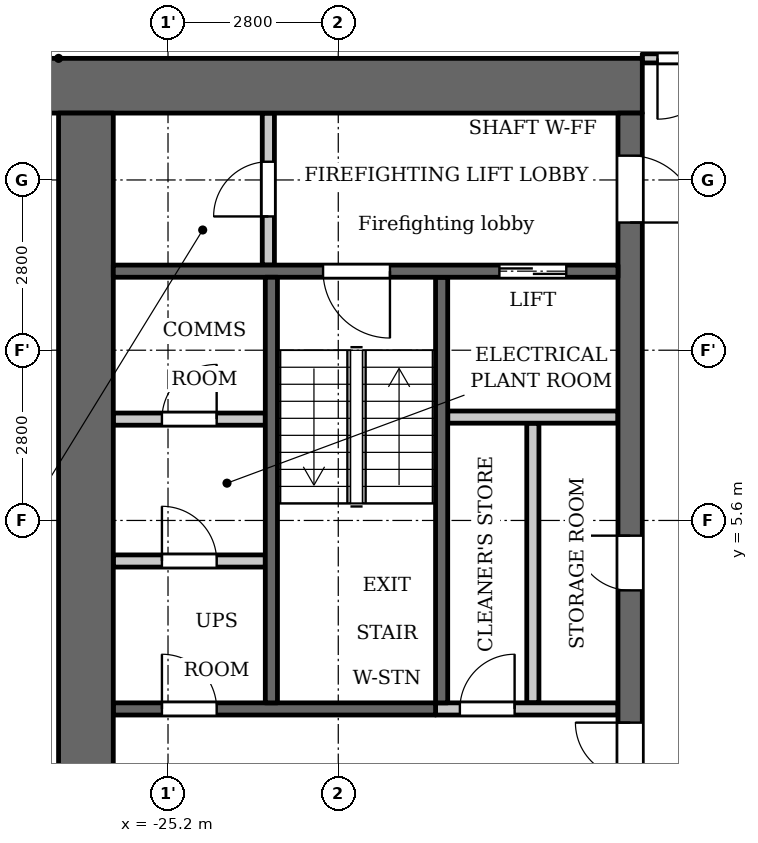
"""IFC4 building model, lengths in metres.
Left out: names, types, materials, properties, quantities, classifications, styles, units other than length and angle.
Written with IfcOpenShell. Run it as: python <this file> out.ifc"""

import sys

from ifc_helpers import new_model, si_unit, direction, frame, frame_2d, origin, place, context, subcontext, project, spatial, rectangle, extrude, element, fill, save


model = new_model("IFC4")
c1 = context("Model", 3, precision=1e-05, world=origin(), true_north=direction((0.0, 1.0)))
c2 = subcontext(c1, "Body", "Model", "MODEL_VIEW")
j1 = project(units=[si_unit("LENGTHUNIT", "METRE"), si_unit("PLANEANGLEUNIT", "RADIAN")], contexts=[c1])
p1 = place(None, origin())
s1 = spatial("IfcSite", under=j1, at=p1, CompositionType="ELEMENT")
p2 = place(p1, origin())
s2 = spatial("IfcBuilding", under=s1, at=p2, CompositionType="ELEMENT")
p3 = place(p2, frame((0.0, 0.0, 90.3)))
s3 = spatial("IfcBuildingStorey", under=s2, at=p3, CompositionType="ELEMENT", Elevation=90.3)
p4 = place(p3, frame((-20.7, 2.6, 0.0), z_axis=(0.0, 0.0, 1.0), x_axis=(0.0, 1.0, 0.0)))
e1 = element("IfcWall", 1, at=p4, inside=s3, PredefinedType="SHEAR", context=c2, shape_type="SweptSolid", body=[
    extrude(rectangle(XDim=7.0, YDim=0.2, at=frame_2d((3.5, 0.0))), origin(), (0.0, 0.0, 1.0), 3.2),
])
p5 = place(p3, frame((-20.8, 2.5, 0.0), z_axis=(0.0, 0.0, 1.0), x_axis=(-1.0, 0.0, 0.0)))
e2 = element("IfcWall", 2, at=p5, inside=s3, PredefinedType="SHEAR", context=c2, shape_type="SweptSolid", body=[
    extrude(rectangle(XDim=5.3, YDim=0.2, at=frame_2d((2.65, 0.0))), origin(), (0.0, 0.0, 1.0), 3.2),
])
p6 = place(p5, frame((3.6, 0.0, 0.0)))
e3 = element("IfcOpeningElement", 3, at=p6, cuts=e2, PredefinedType="OPENING", context=c2, shape_type="SweptSolid", body=[
    extrude(rectangle(XDim=0.9, YDim=2.1, at=frame_2d((0.45, 1.05))), frame((0.0, 0.11, 0.0), z_axis=(0.0, -1.0, 0.0), x_axis=(1.0, 0.0, 0.0)), (0.0, 0.0, 1.0), 0.22),
])
p7 = place(p3, frame((-17.4, 12.75, 0.0), z_axis=(0.0, 0.0, 1.0), x_axis=(-1.0, 0.0, 0.0)))
e4 = element("IfcWall", 4, at=p7, inside=s3, PredefinedType="SHEAR", context=c2, shape_type="SweptSolid", body=[
    extrude(rectangle(XDim=10.4, YDim=0.9, at=frame_2d((5.2, 0.0))), origin(), (0.0, 0.0, 1.0), 3.2),
])
p8 = place(p3, frame((-19.2, 2.6, 0.0), z_axis=(0.0, 0.0, 1.0), x_axis=(0.0, 1.0, 0.0)))
e5 = element("IfcWall", 5, at=p8, inside=s3, PredefinedType="PARTITIONING", context=c2, shape_type="SweptSolid", body=[
    extrude(rectangle(XDim=4.6, YDim=0.2, at=frame_2d((2.3, 0.0))), origin(), (0.0, 0.0, 1.0), 3.2),
])
p9 = place(p3, frame((-17.6, -12.3, 0.0), z_axis=(0.0, 0.0, 1.0), x_axis=(0.0, 1.0, 0.0)))
e6 = element("IfcWall", 6, at=p9, inside=s3, PredefinedType="SHEAR", context=c2, shape_type="SweptSolid", body=[
    extrude(rectangle(XDim=24.6, YDim=0.4, at=frame_2d((12.3, 0.0))), origin(), (0.0, 0.0, 1.0), 3.2),
])
p10 = place(p9, frame((6.0, 0.0, 0.0)))
e7 = element("IfcOpeningElement", 7, at=p10, cuts=e6, PredefinedType="OPENING", context=c2, shape_type="SweptSolid", body=[
    extrude(rectangle(XDim=1.1, YDim=2.1, at=frame_2d((0.55, 1.05))), frame((0.0, 0.21, 0.0), z_axis=(0.0, -1.0, 0.0), x_axis=(1.0, 0.0, 0.0)), (0.0, 0.0, 1.0), 0.42),
])
p11 = place(p9, frame((8.4, 0.0, 0.0)))
e8 = element("IfcOpeningElement", 8, at=p11, cuts=e6, PredefinedType="OPENING", context=c2, shape_type="SweptSolid", body=[
    extrude(rectangle(XDim=1.1, YDim=2.1, at=frame_2d((0.55, 1.05))), frame((0.0, 0.21, 0.0), z_axis=(0.0, -1.0, 0.0), x_axis=(1.0, 0.0, 0.0)), (0.0, 0.0, 1.0), 0.42),
])
p12 = place(p9, frame((10.8, 0.0, 0.0)))
e9 = element("IfcOpeningElement", 9, at=p12, cuts=e6, PredefinedType="OPENING", context=c2, shape_type="SweptSolid", body=[
    extrude(rectangle(XDim=1.1, YDim=2.1, at=frame_2d((0.55, 1.05))), frame((0.0, 0.21, 0.0), z_axis=(0.0, -1.0, 0.0), x_axis=(1.0, 0.0, 0.0)), (0.0, 0.0, 1.0), 0.42),
])
p13 = place(p9, frame((16.75, 0.0, 0.0)))
e10 = element("IfcOpeningElement", 10, at=p13, cuts=e6, PredefinedType="OPENING", context=c2, shape_type="SweptSolid", body=[
    extrude(rectangle(XDim=0.9, YDim=2.1, at=frame_2d((0.45, 1.05))), frame((0.0, 0.21, 0.0), z_axis=(0.0, -1.0, 0.0), x_axis=(1.0, 0.0, 0.0)), (0.0, 0.0, 1.0), 0.42),
])
p14 = place(p9, frame((22.8, 0.0, 0.0)))
e11 = element("IfcOpeningElement", 11, at=p14, cuts=e6, PredefinedType="OPENING", context=c2, shape_type="SweptSolid", body=[
    extrude(rectangle(XDim=1.1, YDim=2.1, at=frame_2d((0.55, 1.05))), frame((0.0, 0.21, 0.0), z_axis=(0.0, -1.0, 0.0), x_axis=(1.0, 0.0, 0.0)), (0.0, 0.0, 1.0), 0.42),
])
p15 = place(p9, frame((0.7, 0.0, 0.0)))
e12 = element("IfcOpeningElement", 12, at=p15, cuts=e6, PredefinedType="OPENING", context=c2, shape_type="SweptSolid", body=[
    extrude(rectangle(XDim=1.1, YDim=2.1, at=frame_2d((0.55, 1.05))), frame((0.0, 0.21, 0.0), z_axis=(0.0, -1.0, 0.0), x_axis=(1.0, 0.0, 0.0)), (0.0, 0.0, 1.0), 0.42),
])
p16 = place(p9, frame((12.775, 0.0, 0.0)))
e13 = element("IfcOpeningElement", 13, at=p16, cuts=e6, PredefinedType="OPENING", context=c2, shape_type="SweptSolid", body=[
    extrude(rectangle(XDim=1.8, YDim=2.1, at=frame_2d((0.9, 1.05))), frame((0.0, 0.21, 0.0), z_axis=(0.0, -1.0, 0.0), x_axis=(1.0, 0.0, 0.0)), (0.0, 0.0, 1.0), 0.42),
])
p17 = place(p3, frame((-26.55, -12.3, 0.0), z_axis=(0.0, 0.0, 1.0), x_axis=(0.0, 1.0, 0.0)))
e14 = element("IfcWall", 14, at=p17, inside=s3, PredefinedType="SHEAR", context=c2, shape_type="SweptSolid", body=[
    extrude(rectangle(XDim=24.6, YDim=0.9, at=frame_2d((12.3, 0.0))), origin(), (0.0, 0.0, 1.0), 3.2),
])
p18 = place(p3, frame((-23.55, 9.8, 0.0), z_axis=(0.0, 0.0, 1.0), x_axis=(0.0, 1.0, 0.0)))
e15 = element("IfcWall", 15, at=p18, inside=s3, PredefinedType="PARTITIONING", context=c2, shape_type="SweptSolid", body=[
    extrude(rectangle(XDim=2.5, YDim=0.2, at=frame_2d((1.25, 0.0))), origin(), (0.0, 0.0, 1.0), 3.2),
])
p19 = place(p18, frame((0.8, 0.0, 0.0)))
e16 = element("IfcOpeningElement", 16, at=p19, cuts=e15, PredefinedType="OPENING", context=c2, shape_type="SweptSolid", body=[
    extrude(rectangle(XDim=0.9, YDim=2.1, at=frame_2d((0.45, 1.05))), frame((0.0, 0.11, 0.0), z_axis=(0.0, -1.0, 0.0), x_axis=(1.0, 0.0, 0.0)), (0.0, 0.0, 1.0), 0.22),
])
p20 = place(p3, frame((-23.6, 4.933, 0.0), z_axis=(0.0, 0.0, 1.0), x_axis=(-1.0, 0.0, 0.0)))
e17 = element("IfcWall", 17, at=p20, inside=s3, PredefinedType="PARTITIONING", context=c2, shape_type="SweptSolid", body=[
    extrude(rectangle(XDim=2.5, YDim=0.2, at=frame_2d((1.25, 0.0))), origin(), (0.0, 0.0, 1.0), 3.2),
])
p21 = place(p20, frame((0.8, 0.0, 0.0)))
e18 = element("IfcOpeningElement", 18, at=p21, cuts=e17, PredefinedType="OPENING", context=c2, shape_type="SweptSolid", body=[
    extrude(rectangle(XDim=0.9, YDim=2.1, at=frame_2d((0.45, 1.05))), frame((0.0, 0.11, 0.0), z_axis=(0.0, -1.0, 0.0), x_axis=(1.0, 0.0, 0.0)), (0.0, 0.0, 1.0), 0.22),
])
p22 = place(p3, frame((-23.6, 7.267, 0.0), z_axis=(0.0, 0.0, 1.0), x_axis=(-1.0, 0.0, 0.0)))
e19 = element("IfcWall", 19, at=p22, inside=s3, PredefinedType="PARTITIONING", context=c2, shape_type="SweptSolid", body=[
    extrude(rectangle(XDim=2.5, YDim=0.2, at=frame_2d((1.25, 0.0))), origin(), (0.0, 0.0, 1.0), 3.2),
])
p23 = place(p22, frame((0.8, 0.0, 0.0)))
e20 = element("IfcOpeningElement", 20, at=p23, cuts=e19, PredefinedType="OPENING", context=c2, shape_type="SweptSolid", body=[
    extrude(rectangle(XDim=0.9, YDim=2.1, at=frame_2d((0.45, 1.05))), frame((0.0, 0.11, 0.0), z_axis=(0.0, -1.0, 0.0), x_axis=(1.0, 0.0, 0.0)), (0.0, 0.0, 1.0), 0.22),
])
p24 = place(p3, frame((-17.8, 2.5, 0.0), z_axis=(0.0, 0.0, 1.0), x_axis=(-1.0, 0.0, 0.0)))
e21 = element("IfcWall", 21, at=p24, inside=s3, PredefinedType="PARTITIONING", context=c2, shape_type="SweptSolid", body=[
    extrude(rectangle(XDim=3.0, YDim=0.2, at=frame_2d((1.5, 0.0))), origin(), (0.0, 0.0, 1.0), 3.2),
])
p25 = place(p24, frame((1.7, 0.0, 0.0)))
e22 = element("IfcOpeningElement", 22, at=p25, cuts=e21, PredefinedType="OPENING", context=c2, shape_type="SweptSolid", body=[
    extrude(rectangle(XDim=0.9, YDim=2.1, at=frame_2d((0.45, 1.05))), frame((0.0, 0.11, 0.0), z_axis=(0.0, -1.0, 0.0), x_axis=(1.0, 0.0, 0.0)), (0.0, 0.0, 1.0), 0.22),
])
p26 = place(p3, frame((-17.8, 7.3, 0.0), z_axis=(0.0, 0.0, 1.0), x_axis=(-1.0, 0.0, 0.0)))
e23 = element("IfcWall", 23, at=p26, inside=s3, PredefinedType="PARTITIONING", context=c2, shape_type="SweptSolid", body=[
    extrude(rectangle(XDim=2.8, YDim=0.2, at=frame_2d((1.4, 0.0))), origin(), (0.0, 0.0, 1.0), 3.2),
])
p27 = place(p3, frame((-17.8, 9.7, 0.0), z_axis=(0.0, 0.0, 1.0), x_axis=(-1.0, 0.0, 0.0)))
e24 = element("IfcWall", 24, at=p27, inside=s3, PredefinedType="SHEAR", context=c2, shape_type="SweptSolid", body=[
    extrude(rectangle(XDim=8.3, YDim=0.2, at=frame_2d((4.15, 0.0))), origin(), (0.0, 0.0, 1.0), 3.2),
])
p28 = place(p27, frame((0.85, 0.0, 0.0)))
e25 = element("IfcOpeningElement", 25, at=p28, cuts=e24, PredefinedType="OPENING", context=c2, shape_type="SweptSolid", body=[
    extrude(rectangle(XDim=1.1, YDim=2.1, at=frame_2d((0.55, 1.05))), frame((0.0, 0.11, 0.0), z_axis=(0.0, -1.0, 0.0), x_axis=(1.0, 0.0, 0.0)), (0.0, 0.0, 1.0), 0.22),
])
p29 = place(p27, frame((3.75, 0.0, 0.0)))
e26 = element("IfcOpeningElement", 26, at=p29, cuts=e24, PredefinedType="OPENING", context=c2, shape_type="SweptSolid", body=[
    extrude(rectangle(XDim=1.1, YDim=2.1, at=frame_2d((0.55, 1.05))), frame((0.0, 0.11, 0.0), z_axis=(0.0, -1.0, 0.0), x_axis=(1.0, 0.0, 0.0)), (0.0, 0.0, 1.0), 0.22),
])
p30 = place(p3, frame((-23.5, 2.6, 0.0), z_axis=(0.0, 0.0, 1.0), x_axis=(0.0, 1.0, 0.0)))
e27 = element("IfcWall", 27, at=p30, inside=s3, PredefinedType="SHEAR", context=c2, shape_type="SweptSolid", body=[
    extrude(rectangle(XDim=7.0, YDim=0.2, at=frame_2d((3.5, 0.0))), origin(), (0.0, 0.0, 1.0), 3.2),
])
p31 = place(p3, frame((-17.4, 13.2, 0.0), z_axis=(0.0, 0.0, 1.0), x_axis=(1.0, 0.0, 0.0)))
e28 = element("IfcWall", 28, at=p31, inside=s3, PredefinedType="PARTITIONING", context=c2, shape_type="SweptSolid", body=[
    extrude(rectangle(XDim=34.8, YDim=0.15, at=frame_2d((17.4, 0.0))), origin(), (0.0, 0.0, 1.0), 3.2),
])
p32 = place(p31, frame((0.25, 0.0, 0.0)))
e29 = element("IfcOpeningElement", 29, at=p32, cuts=e28, PredefinedType="OPENING", context=c2, shape_type="SweptSolid", body=[
    extrude(rectangle(XDim=1.0, YDim=2.1, at=frame_2d((0.5, 1.05))), frame((0.0, 0.085, 0.0), z_axis=(0.0, -1.0, 0.0), x_axis=(1.0, 0.0, 0.0)), (0.0, 0.0, 1.0), 0.17),
])
p33 = place(p31, frame((33.65, 0.0, 0.0)))
e30 = element("IfcOpeningElement", 30, at=p33, cuts=e28, PredefinedType="OPENING", context=c2, shape_type="SweptSolid", body=[
    extrude(rectangle(XDim=1.0, YDim=2.1, at=frame_2d((0.5, 1.05))), frame((0.0, 0.085, 0.0), z_axis=(0.0, -1.0, 0.0), x_axis=(1.0, 0.0, 0.0)), (0.0, 0.0, 1.0), 0.17),
])
p34 = place(p31, frame((15.75, 0.0, 0.0)))
e31 = element("IfcOpeningElement", 31, at=p34, cuts=e28, PredefinedType="OPENING", context=c2, shape_type="SweptSolid", body=[
    extrude(rectangle(XDim=1.0, YDim=2.1, at=frame_2d((0.5, 1.05))), frame((0.0, 0.085, 0.0), z_axis=(0.0, -1.0, 0.0), x_axis=(1.0, 0.0, 0.0)), (0.0, 0.0, 1.0), 0.17),
])
p35 = place(p31, frame((21.35, 0.0, 0.0)))
e32 = element("IfcOpeningElement", 32, at=p35, cuts=e28, PredefinedType="OPENING", context=c2, shape_type="SweptSolid", body=[
    extrude(rectangle(XDim=1.0, YDim=2.1, at=frame_2d((0.5, 1.05))), frame((0.0, 0.085, 0.0), z_axis=(0.0, -1.0, 0.0), x_axis=(1.0, 0.0, 0.0)), (0.0, 0.0, 1.0), 0.17),
])
p36 = place(p13, origin())
e33 = element("IfcDoor", 33, at=p36, inside=s3, OperationType="SINGLE_SWING_LEFT", PredefinedType="DOOR", context=c2, shape_type="SweptSolid", body=[
    extrude(rectangle(XDim=0.9, YDim=2.1, at=frame_2d((0.45, 1.05))), frame((0.0, 0.025, 0.0), z_axis=(0.0, -1.0, 0.0), x_axis=(1.0, 0.0, 0.0)), (0.0, 0.0, 1.0), 0.05),
])
fill(e10, e33)
p37 = place(p25, origin())
e34 = element("IfcDoor", 34, at=p37, inside=s3, OperationType="SINGLE_SWING_LEFT", PredefinedType="DOOR", context=c2, shape_type="SweptSolid", body=[
    extrude(rectangle(XDim=0.9, YDim=2.1, at=frame_2d((0.45, 1.05))), frame((0.0, 0.025, 0.0), z_axis=(0.0, -1.0, 0.0), x_axis=(1.0, 0.0, 0.0)), (0.0, 0.0, 1.0), 0.05),
])
fill(e22, e34)
p38 = place(p28, origin())
e35 = element("IfcDoor", 35, at=p38, inside=s3, OperationType="DOUBLE_DOOR_SLIDING", PredefinedType="DOOR", context=c2, shape_type="SweptSolid", body=[
    extrude(rectangle(XDim=1.1, YDim=2.1, at=frame_2d((0.55, 1.05))), frame((0.0, 0.025, 0.0), z_axis=(0.0, -1.0, 0.0), x_axis=(1.0, 0.0, 0.0)), (0.0, 0.0, 1.0), 0.05),
])
fill(e25, e35)
p39 = place(p14, origin())
e36 = element("IfcDoor", 36, at=p39, inside=s3, OperationType="SINGLE_SWING_LEFT", PredefinedType="DOOR", context=c2, shape_type="SweptSolid", body=[
    extrude(rectangle(XDim=1.1, YDim=2.1, at=frame_2d((0.55, 1.05))), frame((0.0, 0.025, 0.0), z_axis=(0.0, -1.0, 0.0), x_axis=(1.0, 0.0, 0.0)), (0.0, 0.0, 1.0), 0.05),
])
fill(e11, e36)
p40 = place(p19, origin())
e37 = element("IfcDoor", 37, at=p40, inside=s3, OperationType="SINGLE_SWING_RIGHT", PredefinedType="DOOR", context=c2, shape_type="SweptSolid", body=[
    extrude(rectangle(XDim=0.9, YDim=2.1, at=frame_2d((0.45, 1.05))), frame((0.0, 0.025, 0.0), z_axis=(0.0, -1.0, 0.0), x_axis=(1.0, 0.0, 0.0)), (0.0, 0.0, 1.0), 0.05),
])
fill(e16, e37)
p41 = place(p29, origin())
e38 = element("IfcDoor", 38, at=p41, inside=s3, OperationType="SINGLE_SWING_RIGHT", PredefinedType="DOOR", context=c2, shape_type="SweptSolid", body=[
    extrude(rectangle(XDim=1.1, YDim=2.1, at=frame_2d((0.55, 1.05))), frame((0.0, 0.025, 0.0), z_axis=(0.0, -1.0, 0.0), x_axis=(1.0, 0.0, 0.0)), (0.0, 0.0, 1.0), 0.05),
])
fill(e26, e38)
p42 = place(p16, origin())
e39 = element("IfcDoor", 39, at=p42, inside=s3, OperationType="DOUBLE_DOOR_SINGLE_SWING", PredefinedType="DOOR", context=c2, shape_type="SweptSolid", body=[
    extrude(rectangle(XDim=1.8, YDim=2.1, at=frame_2d((0.9, 1.05))), frame((0.0, 0.025, 0.0), z_axis=(0.0, -1.0, 0.0), x_axis=(1.0, 0.0, 0.0)), (0.0, 0.0, 1.0), 0.05),
])
fill(e13, e39)
p43 = place(p21, origin())
e40 = element("IfcDoor", 40, at=p43, inside=s3, OperationType="SINGLE_SWING_RIGHT", PredefinedType="DOOR", context=c2, shape_type="SweptSolid", body=[
    extrude(rectangle(XDim=0.9, YDim=2.1, at=frame_2d((0.45, 1.05))), frame((0.0, 0.025, 0.0), z_axis=(0.0, -1.0, 0.0), x_axis=(1.0, 0.0, 0.0)), (0.0, 0.0, 1.0), 0.05),
])
fill(e18, e40)
p44 = place(p23, origin())
e41 = element("IfcDoor", 41, at=p44, inside=s3, OperationType="SINGLE_SWING_LEFT", PredefinedType="DOOR", context=c2, shape_type="SweptSolid", body=[
    extrude(rectangle(XDim=0.9, YDim=2.1, at=frame_2d((0.45, 1.05))), frame((0.0, 0.025, 0.0), z_axis=(0.0, -1.0, 0.0), x_axis=(1.0, 0.0, 0.0)), (0.0, 0.0, 1.0), 0.05),
])
fill(e20, e41)
p45 = place(p6, origin())
e42 = element("IfcDoor", 42, at=p45, inside=s3, OperationType="SINGLE_SWING_RIGHT", PredefinedType="DOOR", context=c2, shape_type="SweptSolid", body=[
    extrude(rectangle(XDim=0.9, YDim=2.1, at=frame_2d((0.45, 1.05))), frame((0.0, 0.025, 0.0), z_axis=(0.0, -1.0, 0.0), x_axis=(1.0, 0.0, 0.0)), (0.0, 0.0, 1.0), 0.05),
])
fill(e3, e42)
p46 = place(p32, origin())
e43 = element("IfcDoor", 43, at=p46, inside=s3, OperationType="SINGLE_SWING_LEFT", PredefinedType="DOOR", context=c2, shape_type="SweptSolid", body=[
    extrude(rectangle(XDim=1.0, YDim=2.1, at=frame_2d((0.5, 1.05))), frame((0.0, 0.025, 0.0), z_axis=(0.0, -1.0, 0.0), x_axis=(1.0, 0.0, 0.0)), (0.0, 0.0, 1.0), 0.05),
])
fill(e29, e43)
save(model, sys.argv[1])
